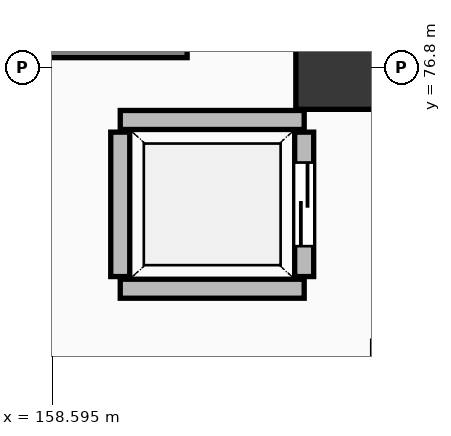
"""IFC4 building model, lengths in metres.
Left out: names, types, materials, properties, quantities, classifications, styles, units other than length and angle.
Written with IfcOpenShell. Run it as: python <this file> out.ifc"""

import sys

from ifc_helpers import new_model, si_unit, direction, frame, frame_2d, origin, origin_2d, place, context, subcontext, project, spatial, rectangle, extrude, element, fill, save


model = new_model("IFC4")
c1 = context("Model", 3, precision=1e-05, world=origin(), true_north=direction((0.0, 1.0)))
c2 = subcontext(c1, "Body", "Model", "MODEL_VIEW")
j1 = project(units=[si_unit("LENGTHUNIT", "METRE"), si_unit("PLANEANGLEUNIT", "RADIAN")], contexts=[c1])
p1 = place(None, origin())
s1 = spatial("IfcSite", under=j1, at=p1, CompositionType="ELEMENT")
p2 = place(p1, origin())
s2 = spatial("IfcBuilding", under=s1, at=p2, CompositionType="ELEMENT")
p3 = place(p2, frame((0.0, 0.0, -4.2)))
s3 = spatial("IfcBuildingStorey", under=s2, at=p3, CompositionType="ELEMENT", Elevation=-4.2)
p4 = place(p3, frame((162.35, 76.8, 0.0), z_axis=(0.0, 0.0, 1.0), x_axis=(1.0, 0.0, 0.0)))
e1 = element("IfcColumn", 1, at=p4, inside=s3, PredefinedType="COLUMN", context=c2, shape_type="SweptSolid", body=[
    extrude(rectangle(XDim=1.1, YDim=1.1, at=origin_2d()), origin(), (0.0, 0.0, 1.0), 4.2),
])
p5 = place(p3, frame((156.7, 77.18, 0.0), z_axis=(0.0, 0.0, 1.0), x_axis=(1.0, 0.0, 0.0)))
e2 = element("IfcWall", 2, at=p5, inside=s3, PredefinedType="SHEAR", context=c2, shape_type="SweptSolid", body=[
    extrude(rectangle(XDim=3.67, YDim=0.5, at=frame_2d((1.835, 0.0))), origin(), (0.0, 0.0, 1.0), 3.78),
])
for number, where, z_axis, x_axis in (
    (3, (159.49, 73.89, 0.0), (0.0, 0.0, 1.0), (1.0, 0.0, 0.0)),
    (4, (159.49, 76.11, 0.0), (0.0, 0.0, 1.0), (1.0, 0.0, 0.0)),
):
    element("IfcWall", number, at=place(p3, frame(where, z_axis=z_axis, x_axis=x_axis)), inside=s3, PredefinedType="SOLIDWALL", context=c2, shape_type="SweptSolid", body=[
        extrude(rectangle(XDim=2.42, YDim=0.25, at=frame_2d((1.21, 0.0))), origin(), (0.0, 0.0, 1.0), 3.78),
    ])
p6 = place(p3, frame((159.49, 74.05, 0.0), z_axis=(0.0, 0.0, 1.0), x_axis=(0.0, 1.0, 0.0)))
e5 = element("IfcWall", 5, at=p6, inside=s3, PredefinedType="SOLIDWALL", context=c2, shape_type="SweptSolid", body=[
    extrude(rectangle(XDim=1.9, YDim=0.25, at=frame_2d((0.95, 0.0))), origin(), (0.0, 0.0, 1.0), 3.78),
])
p7 = place(p3, frame((161.91, 74.05, 0.0), z_axis=(0.0, 0.0, 1.0), x_axis=(0.0, 1.0, 0.0)))
e6 = element("IfcWall", 6, at=p7, inside=s3, PredefinedType="SOLIDWALL", context=c2, shape_type="SweptSolid", body=[
    extrude(rectangle(XDim=1.9, YDim=0.25, at=frame_2d((0.95, 0.0))), origin(), (0.0, 0.0, 1.0), 3.78),
])
p8 = place(p7, frame((0.4, 0.0, 0.0)))
e7 = element("IfcOpeningElement", 7, at=p8, cuts=e6, PredefinedType="OPENING", context=c2, shape_type="SweptSolid", body=[
    extrude(rectangle(XDim=1.1, YDim=2.2, at=frame_2d((0.55, 1.1))), frame((0.0, 0.137, 0.0), z_axis=(0.0, -1.0, 0.0), x_axis=(1.0, 0.0, 0.0)), (0.0, 0.0, 1.0), 0.274),
])
p9 = place(p8, origin())
e8 = element("IfcDoor", 8, at=p9, inside=s3, OperationType="SLIDING_TO_LEFT", PredefinedType="DOOR", context=c2, shape_type="SweptSolid", body=[
    extrude(rectangle(XDim=1.1, YDim=2.2, at=frame_2d((0.55, 1.1))), frame((0.0, 0.025, 0.0), z_axis=(0.0, -1.0, 0.0), x_axis=(1.0, 0.0, 0.0)), (0.0, 0.0, 1.0), 0.05),
])
fill(e7, e8)
save(model, sys.argv[1])
